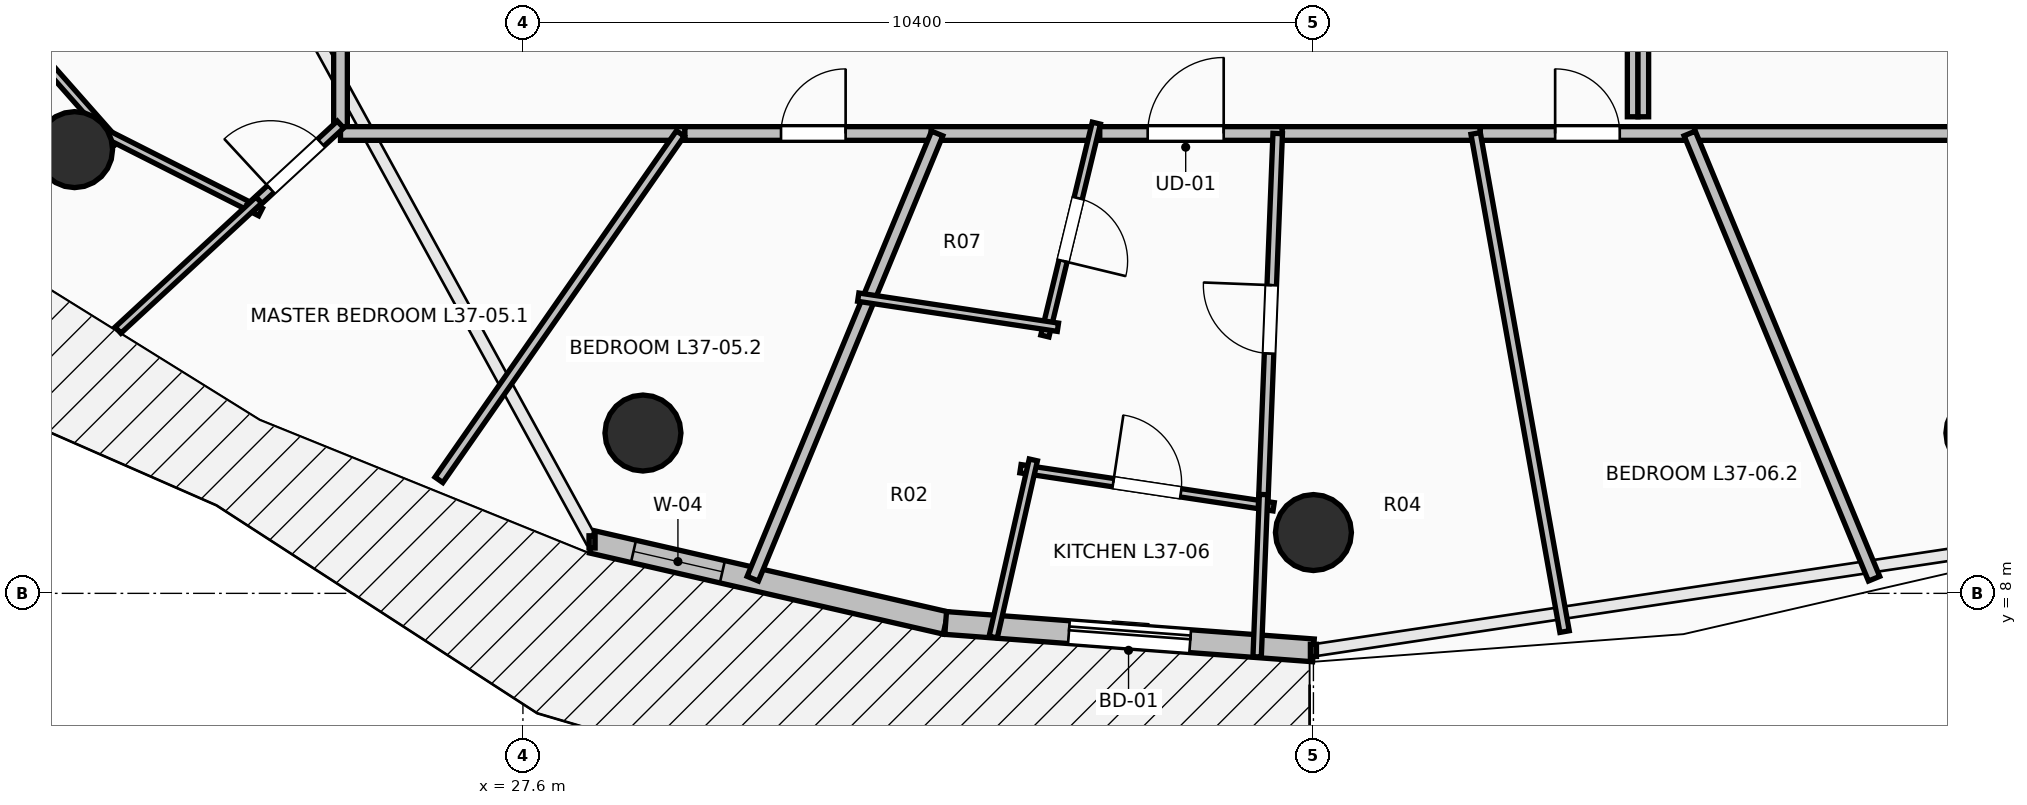
"""IFC4 building model, lengths in metres.
Left out: names, types, materials, properties, quantities, classifications, styles, units other than length and angle.
Written with IfcOpenShell. Run it as: python <this file> out.ifc"""

import sys

from ifc_helpers import new_model, si_unit, direction, frame, frame_2d, origin, origin_2d, place, context, subcontext, project, spatial, rectangle, circle, extrude, element, fill, save


model = new_model("IFC4")
c1 = context("Model", 3, precision=1e-05, world=origin(), true_north=direction((0.0, 1.0)))
c2 = subcontext(c1, "Body", "Model", "MODEL_VIEW")
j1 = project(units=[si_unit("LENGTHUNIT", "METRE"), si_unit("PLANEANGLEUNIT", "RADIAN")], contexts=[c1])
p1 = place(None, origin())
s1 = spatial("IfcSite", under=j1, at=p1, CompositionType="ELEMENT")
p2 = place(p1, origin())
s2 = spatial("IfcBuilding", under=s1, at=p2, CompositionType="ELEMENT")
p3 = place(p2, frame((0.0, 0.0, 139.6)))
s3 = spatial("IfcBuildingStorey", under=s2, at=p3, CompositionType="ELEMENT", Elevation=139.6)
for number, where, z_axis, x_axis in (
    (1, (21.701, 13.838, 0.0), (0.0, 0.0, 1.0), (-0.707, -0.707, 0.0)),
    (2, (29.179, 10.109, 0.0), (0.0, 0.0, 1.0), (-0.383, -0.924, 0.0)),
    (3, (38.0, 8.8, 0.0), (0.0, 0.0, 1.0), (0.0, -1.0, 0.0)),
    (4, (46.821, 10.109, 0.0), (0.0, 0.0, 1.0), (0.383, -0.924, 0.0)),
):
    element("IfcColumn", number, at=place(p3, frame(where, z_axis=z_axis, x_axis=x_axis)), inside=s3, PredefinedType="COLUMN", context=c2, shape_type="SweptSolid", body=[
        extrude(circle(Radius=0.5, at=origin_2d()), origin(), (0.0, 0.0, 1.0), 3.5),
    ])
p4 = place(p3, frame((28.51, 8.677, 0.0), z_axis=(0.0, 0.0, 1.0), x_axis=(0.974698897188, -0.223521944832, 0.0)))
e5 = element("IfcWall", 5, at=p4, inside=s3, PredefinedType="STANDARD", context=c2, shape_type="SweptSolid", body=[
    extrude(rectangle(XDim=4.773, YDim=0.3, at=frame_2d((2.387, 0.0))), origin(), (0.0, 0.0, 1.0), 3.24),
])
p5 = place(p4, frame((0.559, 0.0, 0.85)))
e6 = element("IfcOpeningElement", 6, at=p5, cuts=e5, PredefinedType="OPENING", context=c2, shape_type="SweptSolid", body=[
    extrude(rectangle(XDim=1.2, YDim=1.95, at=frame_2d((0.6, 0.975))), frame((0.0, 0.165, 0.0), z_axis=(0.0, -1.0, 0.0), x_axis=(1.0, 0.0, 0.0)), (0.0, 0.0, 1.0), 0.33),
])
p6 = place(p3, frame((33.162, 7.61, 0.0), z_axis=(0.0, 0.0, 1.0), x_axis=(0.997237740067, -0.074275768499, 0.0)))
e7 = element("IfcWall", 7, at=p6, inside=s3, PredefinedType="STANDARD", context=c2, shape_type="SweptSolid", body=[
    extrude(rectangle(XDim=4.852, YDim=0.3, at=frame_2d((2.426, 0.0))), origin(), (0.0, 0.0, 1.0), 3.24),
])
p7 = place(p6, frame((1.626, 0.0, 0.0)))
e8 = element("IfcOpeningElement", 8, at=p7, cuts=e7, PredefinedType="OPENING", context=c2, shape_type="SweptSolid", body=[
    extrude(rectangle(XDim=1.6, YDim=2.3, at=frame_2d((0.8, 1.15))), frame((0.0, 0.165, 0.0), z_axis=(0.0, -1.0, 0.0), x_axis=(1.0, 0.0, 0.0)), (0.0, 0.0, 1.0), 0.33),
])
p8 = place(p3, frame((25.2, 18.244, 0.0), z_axis=(0.0, 0.0, 1.0), x_axis=(0.0, -1.0, 0.0)))
e9 = element("IfcWall", 9, at=p8, inside=s3, PredefinedType="PARTITIONING", context=c2, shape_type="SweptSolid", body=[
    extrude(rectangle(XDim=4.158, YDim=0.18, at=frame_2d((2.079, 0.0))), origin(), (0.0, 0.0, 1.0), 2.432),
])
p9 = place(p8, frame((1.579, 0.0, 0.0)))
e10 = element("IfcOpeningElement", 10, at=p9, cuts=e9, PredefinedType="OPENING", context=c2, shape_type="SweptSolid", body=[
    extrude(rectangle(XDim=1.0, YDim=2.15, at=frame_2d((0.5, 1.075))), frame((0.0, 0.105, 0.0), z_axis=(0.0, -1.0, 0.0), x_axis=(1.0, 0.0, 0.0)), (0.0, 0.0, 1.0), 0.21),
])
p10 = place(p3, frame((25.2, 14.05, 0.0), z_axis=(0.0, 0.0, 1.0), x_axis=(1.0, 0.0, 0.0)))
e11 = element("IfcWall", 11, at=p10, inside=s3, PredefinedType="PARTITIONING", context=c2, shape_type="SweptSolid", body=[
    extrude(rectangle(XDim=4.531, YDim=0.18, at=frame_2d((2.266, 0.0))), origin(), (0.0, 0.0, 1.0), 2.432),
])
p11 = place(p3, frame((29.731, 14.05, 0.0), z_axis=(0.0, 0.0, 1.0), x_axis=(1.0, 0.0, 0.0)))
e12 = element("IfcWall", 12, at=p11, inside=s3, PredefinedType="PARTITIONING", context=c2, shape_type="SweptSolid", body=[
    extrude(rectangle(XDim=3.379, YDim=0.18, at=frame_2d((1.689, 0.0))), origin(), (0.0, 0.0, 1.0), 2.972),
])
p12 = place(p11, frame((1.264, 0.0, 0.0)))
e13 = element("IfcOpeningElement", 13, at=p12, cuts=e12, PredefinedType="OPENING", context=c2, shape_type="SweptSolid", body=[
    extrude(rectangle(XDim=0.85, YDim=2.1, at=frame_2d((0.425, 1.05))), frame((0.0, 0.105, 0.0), z_axis=(0.0, -1.0, 0.0), x_axis=(1.0, 0.0, 0.0)), (0.0, 0.0, 1.0), 0.21),
])
p13 = place(p3, frame((35.049, 14.05, 0.0), z_axis=(0.0, 0.0, 1.0), x_axis=(1.0, 0.0, 0.0)))
e14 = element("IfcWall", 14, at=p13, inside=s3, PredefinedType="PARTITIONING", context=c2, shape_type="SweptSolid", body=[
    extrude(rectangle(XDim=2.541, YDim=0.18, at=frame_2d((1.271, 0.0))), origin(), (0.0, 0.0, 1.0), 2.972),
])
p14 = place(p13, frame((0.771, 0.0, 0.0)))
e15 = element("IfcOpeningElement", 15, at=p14, cuts=e14, PredefinedType="OPENING", context=c2, shape_type="SweptSolid", body=[
    extrude(rectangle(XDim=1.0, YDim=2.15, at=frame_2d((0.5, 1.075))), frame((0.0, 0.105, 0.0), z_axis=(0.0, -1.0, 0.0), x_axis=(1.0, 0.0, 0.0)), (0.0, 0.0, 1.0), 0.21),
])
p15 = place(p3, frame((32.97, 14.05, 0.0), z_axis=(0.0, 0.0, 1.0), x_axis=(1.0, 0.0, 0.0)))
e16 = element("IfcWall", 16, at=p15, inside=s3, PredefinedType="PARTITIONING", context=c2, shape_type="SweptSolid", body=[
    extrude(rectangle(XDim=2.219, YDim=0.18, at=frame_2d((1.109, 0.0))), origin(), (0.0, 0.0, 1.0), 2.972),
])
p16 = place(p3, frame((37.59, 14.05, 0.0), z_axis=(0.0, 0.0, 1.0), x_axis=(1.0, 0.0, 0.0)))
e17 = element("IfcWall", 17, at=p16, inside=s3, PredefinedType="PARTITIONING", context=c2, shape_type="SweptSolid", body=[
    extrude(rectangle(XDim=2.605, YDim=0.18, at=frame_2d((1.302, 0.0))), origin(), (0.0, 0.0, 1.0), 2.972),
])
p17 = place(p3, frame((40.195, 14.05, 0.0), z_axis=(0.0, 0.0, 1.0), x_axis=(1.0, 0.0, 0.0)))
e18 = element("IfcWall", 18, at=p17, inside=s3, PredefinedType="PARTITIONING", context=c2, shape_type="SweptSolid", body=[
    extrude(rectangle(XDim=2.82, YDim=0.18, at=frame_2d((1.41, 0.0))), origin(), (0.0, 0.0, 1.0), 2.972),
])
p18 = place(p17, frame((0.985, 0.0, 0.0)))
e19 = element("IfcOpeningElement", 19, at=p18, cuts=e18, PredefinedType="OPENING", context=c2, shape_type="SweptSolid", body=[
    extrude(rectangle(XDim=0.85, YDim=2.1, at=frame_2d((0.425, 1.05))), frame((0.0, 0.105, 0.0), z_axis=(0.0, -1.0, 0.0), x_axis=(1.0, 0.0, 0.0)), (0.0, 0.0, 1.0), 0.21),
])
p19 = place(p3, frame((43.015, 14.05, 0.0), z_axis=(0.0, 0.0, 1.0), x_axis=(1.0, 0.0, 0.0)))
e20 = element("IfcWall", 20, at=p19, inside=s3, PredefinedType="PARTITIONING", context=c2, shape_type="SweptSolid", body=[
    extrude(rectangle(XDim=7.785, YDim=0.18, at=frame_2d((3.893, 0.0))), origin(), (0.0, 0.0, 1.0), 2.432),
])
p20 = place(p19, frame((3.393, 0.0, 0.0)))
e21 = element("IfcOpeningElement", 21, at=p20, cuts=e20, PredefinedType="OPENING", context=c2, shape_type="SweptSolid", body=[
    extrude(rectangle(XDim=1.0, YDim=2.15, at=frame_2d((0.5, 1.075))), frame((0.0, 0.105, 0.0), z_axis=(0.0, -1.0, 0.0), x_axis=(1.0, 0.0, 0.0)), (0.0, 0.0, 1.0), 0.21),
])
p21 = place(p3, frame((20.935, 15.409, 0.0), z_axis=(0.0, 0.0, 1.0), x_axis=(0.66216897397, -0.749354555542, 0.0)))
e22 = element("IfcWall", 22, at=p21, inside=s3, PredefinedType="PARTITIONING", context=c2, shape_type="SweptSolid", body=[
    extrude(rectangle(XDim=1.991, YDim=0.11, at=frame_2d((0.996, 0.0))), origin(), (0.0, 0.0, 1.0), 2.432),
])
p22 = place(p3, frame((22.036, 14.085, 0.0), z_axis=(0.0, 0.0, 1.0), x_axis=(0.892312874209, -0.451417472548, 0.0)))
e23 = element("IfcWall", 23, at=p22, inside=s3, PredefinedType="PARTITIONING", context=c2, shape_type="SweptSolid", body=[
    extrude(rectangle(XDim=2.367, YDim=0.11, at=frame_2d((1.183, 0.0))), origin(), (0.0, 0.0, 1.0), 2.432),
])
p23 = place(p3, frame((24.023, 13.08, 0.0), z_axis=(0.0, 0.0, 1.0), x_axis=(0.734359451791, 0.678760779336, 0.0)))
e24 = element("IfcWall", 24, at=p23, inside=s3, PredefinedType="PARTITIONING", context=c2, shape_type="SweptSolid", body=[
    extrude(rectangle(XDim=1.603, YDim=0.125, at=frame_2d((0.801, 0.0))), origin(), (0.0, 0.0, 1.0), 2.922),
])
p24 = place(p23, frame((0.351, 0.0, 0.0)))
e25 = element("IfcOpeningElement", 25, at=p24, cuts=e24, PredefinedType="OPENING", context=c2, shape_type="SweptSolid", body=[
    extrude(rectangle(XDim=0.9, YDim=2.1, at=frame_2d((0.45, 1.05))), frame((0.0, 0.077, 0.0), z_axis=(0.0, -1.0, 0.0), x_axis=(1.0, 0.0, 0.0)), (0.0, 0.0, 1.0), 0.155),
])
p25 = place(p3, frame((22.273, 11.463, 0.0), z_axis=(0.0, 0.0, 1.0), x_axis=(0.73438401738, 0.678734200565, 0.0)))
e26 = element("IfcWall", 26, at=p25, inside=s3, PredefinedType="PARTITIONING", context=c2, shape_type="SweptSolid", body=[
    extrude(rectangle(XDim=2.522, YDim=0.11, at=frame_2d((1.261, 0.0))), origin(), (0.0, 0.0, 1.0), 2.728),
])
p26 = place(p3, frame((26.495, 9.493, 0.0), z_axis=(0.0, 0.0, 1.0), x_axis=(0.571744252323, 0.820431904509, 0.0)))
e27 = element("IfcWall", 27, at=p26, inside=s3, PredefinedType="PARTITIONING", context=c2, shape_type="SweptSolid", body=[
    extrude(rectangle(XDim=5.554, YDim=0.125, at=frame_2d((2.777, 0.0))), origin(), (0.0, 0.0, 1.0), 2.432),
])
p27 = place(p3, frame((30.624, 8.193, 0.0), z_axis=(0.0, 0.0, 1.0), x_axis=(0.382683979298, 0.923879305964, 0.0)))
e28 = element("IfcWall", 28, at=p27, inside=s3, PredefinedType="PARTITIONING", context=c2, shape_type="SweptSolid", body=[
    extrude(rectangle(XDim=6.34, YDim=0.16, at=frame_2d((3.17, 0.0))), origin(), (0.0, 0.0, 1.0), 2.728),
])
p28 = place(p3, frame((35.144, 14.186, 0.0), z_axis=(0.0, 0.0, 1.0), x_axis=(-0.234930486238, -0.972012174119, 0.0)))
e29 = element("IfcWall", 29, at=p28, inside=s3, PredefinedType="PARTITIONING", context=c2, shape_type="SweptSolid", body=[
    extrude(rectangle(XDim=2.881, YDim=0.11, at=frame_2d((1.44, 0.0))), origin(), (0.0, 0.0, 1.0), 2.922),
])
p29 = place(p28, frame((1.015, 0.0, 0.0)))
e30 = element("IfcOpeningElement", 30, at=p29, cuts=e29, PredefinedType="OPENING", context=c2, shape_type="SweptSolid", body=[
    extrude(rectangle(XDim=0.85, YDim=2.1, at=frame_2d((0.425, 1.05))), frame((0.0, 0.07, 0.0), z_axis=(0.0, -1.0, 0.0), x_axis=(1.0, 0.0, 0.0)), (0.0, 0.0, 1.0), 0.14),
])
p30 = place(p3, frame((34.638, 11.501, 0.0), z_axis=(0.0, 0.0, 1.0), x_axis=(-0.988839741605, 0.148983104484, 0.0)))
e31 = element("IfcWall", 31, at=p30, inside=s3, PredefinedType="PARTITIONING", context=c2, shape_type="SweptSolid", body=[
    extrude(rectangle(XDim=2.656, YDim=0.11, at=frame_2d((1.328, 0.0))), origin(), (0.0, 0.0, 1.0), 3.24),
])
p31 = place(p3, frame((34.146, 9.64, 0.0), z_axis=(0.0, 0.0, 1.0), x_axis=(0.988887919082, -0.148662986296, 0.0)))
e32 = element("IfcWall", 32, at=p31, inside=s3, PredefinedType="PARTITIONING", context=c2, shape_type="SweptSolid", body=[
    extrude(rectangle(XDim=3.368, YDim=0.11, at=frame_2d((1.684, 0.0))), origin(), (0.0, 0.0, 1.0), 3.24),
])
p32 = place(p31, frame((1.234, 0.0, 0.0)))
e33 = element("IfcOpeningElement", 33, at=p32, cuts=e32, PredefinedType="OPENING", context=c2, shape_type="SweptSolid", body=[
    extrude(rectangle(XDim=0.9, YDim=2.1, at=frame_2d((0.45, 1.05))), frame((0.0, 0.07, 0.0), z_axis=(0.0, -1.0, 0.0), x_axis=(1.0, 0.0, 0.0)), (0.0, 0.0, 1.0), 0.14),
])
p33 = place(p3, frame((33.787, 7.426, 0.0), z_axis=(0.0, 0.0, 1.0), x_axis=(0.220932027223, 0.975289208054, 0.0)))
e34 = element("IfcWall", 34, at=p33, inside=s3, PredefinedType="PARTITIONING", context=c2, shape_type="SweptSolid", body=[
    extrude(rectangle(XDim=2.389, YDim=0.11, at=frame_2d((1.195, 0.0))), origin(), (0.0, 0.0, 1.0), 2.728),
])
p34 = place(p3, frame((37.338, 9.16, 0.0), z_axis=(0.0, 0.0, 1.0), x_axis=(0.039260769946, 0.99922899875, 0.0)))
e35 = element("IfcWall", 35, at=p34, inside=s3, PredefinedType="PARTITIONING", context=c2, shape_type="SweptSolid", body=[
    extrude(rectangle(XDim=4.894, YDim=0.125, at=frame_2d((2.447, 0.0))), origin(), (0.0, 0.0, 1.0), 2.922),
])
p35 = place(p34, frame((1.997, 0.0, 0.0)))
e36 = element("IfcOpeningElement", 36, at=p35, cuts=e35, PredefinedType="OPENING", context=c2, shape_type="SweptSolid", body=[
    extrude(rectangle(XDim=0.9, YDim=2.1, at=frame_2d((0.45, 1.05))), frame((0.0, 0.077, 0.0), z_axis=(0.0, -1.0, 0.0), x_axis=(1.0, 0.0, 0.0)), (0.0, 0.0, 1.0), 0.155),
])
p36 = place(p3, frame((37.26, 7.165, 0.0), z_axis=(0.0, 0.0, 1.0), x_axis=(0.039310852952, 0.999227029679, 0.0)))
e37 = element("IfcWall", 37, at=p36, inside=s3, PredefinedType="PARTITIONING", context=c2, shape_type="SweptSolid", body=[
    extrude(rectangle(XDim=2.136, YDim=0.11, at=frame_2d((1.068, 0.0))), origin(), (0.0, 0.0, 1.0), 2.728),
])
p37 = place(p3, frame((41.304, 7.497, 0.0), z_axis=(0.0, 0.0, 1.0), x_axis=(-0.175753825846, 0.984434148484, 0.0)))
e38 = element("IfcWall", 38, at=p37, inside=s3, PredefinedType="PARTITIONING", context=c2, shape_type="SweptSolid", body=[
    extrude(rectangle(XDim=6.656, YDim=0.125, at=frame_2d((3.328, 0.0))), origin(), (0.0, 0.0, 1.0), 2.432),
])
p38 = place(p3, frame((45.376, 8.193, 0.0), z_axis=(0.0, 0.0, 1.0), x_axis=(-0.382683979298, 0.923879305964, 0.0)))
e39 = element("IfcWall", 39, at=p38, inside=s3, PredefinedType="PARTITIONING", context=c2, shape_type="SweptSolid", body=[
    extrude(rectangle(XDim=6.34, YDim=0.16, at=frame_2d((3.17, 0.0))), origin(), (0.0, 0.0, 1.0), 2.432),
])
for number, where, z_axis, x_axis in (
    (40, (42.2, 16.1, 0.0), (0.0, 0.0, 1.0), (0.0, -1.0, 0.0)),
    (41, (42.34, 14.27, 0.0), (0.0, 0.0, 1.0), (0.0, 1.0, 0.0)),
):
    element("IfcWall", number, at=place(p3, frame(where, z_axis=z_axis, x_axis=x_axis)), inside=s3, PredefinedType="PARTITIONING", context=c2, shape_type="SweptSolid", body=[
        extrude(rectangle(XDim=1.83, YDim=0.14, at=frame_2d((0.915, 0.0))), origin(), (0.0, 0.0, 1.0), 3.24),
    ])
p39 = place(p7, origin())
e42 = element("IfcDoor", 42, at=p39, inside=s3, OperationType="SLIDING_TO_LEFT", PredefinedType="DOOR", context=c2, shape_type="SweptSolid", body=[
    extrude(rectangle(XDim=1.6, YDim=2.3, at=frame_2d((0.8, 1.15))), frame((0.0, 0.025, 0.0), z_axis=(0.0, -1.0, 0.0), x_axis=(1.0, 0.0, 0.0)), (0.0, 0.0, 1.0), 0.05),
])
fill(e8, e42)
p40 = place(p5, origin())
e43 = element("IfcWindow", 43, at=p40, inside=s3, PartitioningType="SINGLE_PANEL", PredefinedType="WINDOW", context=c2, shape_type="SweptSolid", body=[
    extrude(rectangle(XDim=1.2, YDim=1.95, at=frame_2d((0.6, 0.975))), frame((0.0, 0.03, 0.0), z_axis=(0.0, -1.0, 0.0), x_axis=(1.0, 0.0, 0.0)), (0.0, 0.0, 1.0), 0.06),
])
fill(e6, e43)
p41 = place(p14, origin())
e44 = element("IfcDoor", 44, at=p41, inside=s3, OperationType="SINGLE_SWING_RIGHT", PredefinedType="DOOR", context=c2, shape_type="SweptSolid", body=[
    extrude(rectangle(XDim=1.0, YDim=2.15, at=frame_2d((0.5, 1.075))), frame((0.0, 0.025, 0.0), z_axis=(0.0, -1.0, 0.0), x_axis=(1.0, 0.0, 0.0)), (0.0, 0.0, 1.0), 0.05),
])
fill(e15, e44)
p42 = place(p24, origin())
e45 = element("IfcDoor", 45, at=p42, inside=s3, OperationType="SINGLE_SWING_LEFT", PredefinedType="DOOR", context=c2, shape_type="SweptSolid", body=[
    extrude(rectangle(XDim=0.9, YDim=2.1, at=frame_2d((0.45, 1.05))), frame((0.0, 0.025, 0.0), z_axis=(0.0, -1.0, 0.0), x_axis=(1.0, 0.0, 0.0)), (0.0, 0.0, 1.0), 0.05),
])
fill(e25, e45)
p43 = place(p29, origin())
e46 = element("IfcDoor", 46, at=p43, inside=s3, OperationType="SINGLE_SWING_RIGHT", PredefinedType="DOOR", context=c2, shape_type="SweptSolid", body=[
    extrude(rectangle(XDim=0.85, YDim=2.1, at=frame_2d((0.425, 1.05))), frame((0.0, 0.025, 0.0), z_axis=(0.0, -1.0, 0.0), x_axis=(1.0, 0.0, 0.0)), (0.0, 0.0, 1.0), 0.05),
])
fill(e30, e46)
p44 = place(p32, origin())
e47 = element("IfcDoor", 47, at=p44, inside=s3, OperationType="SINGLE_SWING_LEFT", PredefinedType="DOOR", context=c2, shape_type="SweptSolid", body=[
    extrude(rectangle(XDim=0.9, YDim=2.1, at=frame_2d((0.45, 1.05))), frame((0.0, 0.025, 0.0), z_axis=(0.0, -1.0, 0.0), x_axis=(1.0, 0.0, 0.0)), (0.0, 0.0, 1.0), 0.05),
])
fill(e33, e47)
p45 = place(p35, origin())
e48 = element("IfcDoor", 48, at=p45, inside=s3, OperationType="SINGLE_SWING_RIGHT", PredefinedType="DOOR", context=c2, shape_type="SweptSolid", body=[
    extrude(rectangle(XDim=0.9, YDim=2.1, at=frame_2d((0.45, 1.05))), frame((0.0, 0.025, 0.0), z_axis=(0.0, -1.0, 0.0), x_axis=(1.0, 0.0, 0.0)), (0.0, 0.0, 1.0), 0.05),
])
fill(e36, e48)
p46 = place(p12, origin())
e49 = element("IfcDoor", 49, at=p46, inside=s3, OperationType="SINGLE_SWING_RIGHT", PredefinedType="DOOR", context=c2, shape_type="SweptSolid", body=[
    extrude(rectangle(XDim=0.85, YDim=2.1, at=frame_2d((0.425, 1.05))), frame((0.0, 0.025, 0.0), z_axis=(0.0, -1.0, 0.0), x_axis=(1.0, 0.0, 0.0)), (0.0, 0.0, 1.0), 0.05),
])
fill(e13, e49)
p47 = place(p18, origin())
e50 = element("IfcDoor", 50, at=p47, inside=s3, OperationType="SINGLE_SWING_LEFT", PredefinedType="DOOR", context=c2, shape_type="SweptSolid", body=[
    extrude(rectangle(XDim=0.85, YDim=2.1, at=frame_2d((0.425, 1.05))), frame((0.0, 0.025, 0.0), z_axis=(0.0, -1.0, 0.0), x_axis=(1.0, 0.0, 0.0)), (0.0, 0.0, 1.0), 0.05),
])
fill(e19, e50)
save(model, sys.argv[1])
